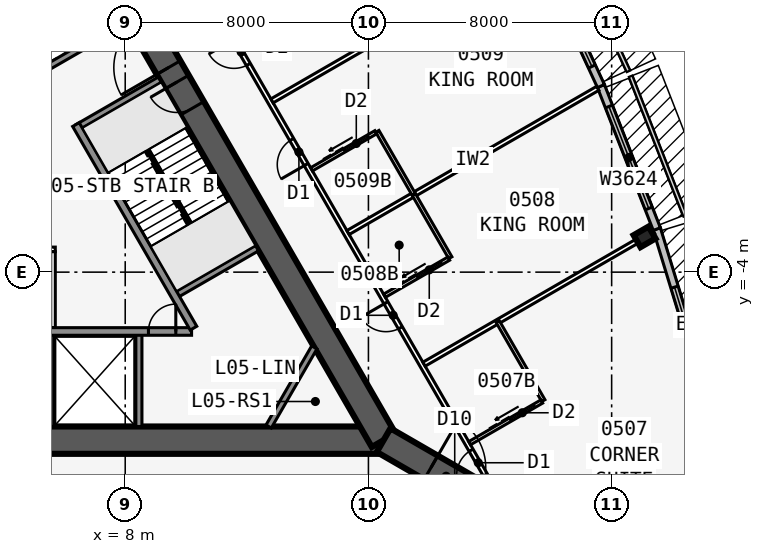
"""IFC4 building model, lengths in metres.
Left out: names, types, materials, properties, quantities, classifications, styles, units other than length and angle.
Written with IfcOpenShell. Run it as: python <this file> out.ifc"""

import sys

from ifc_helpers import new_model, si_unit, direction, frame, frame_2d, origin, origin_2d, place, context, subcontext, project, spatial, rectangle, i_section, extrude, element, fill, save


model = new_model("IFC4")
c1 = context("Model", 3, precision=1e-05, world=origin(), true_north=direction((0.0, 1.0)))
c2 = subcontext(c1, "Body", "Model", "MODEL_VIEW")
j1 = project(units=[si_unit("LENGTHUNIT", "METRE"), si_unit("PLANEANGLEUNIT", "RADIAN")], contexts=[c1])
p1 = place(None, origin())
s1 = spatial("IfcSite", under=j1, at=p1, CompositionType="ELEMENT")
p2 = place(p1, origin())
s2 = spatial("IfcBuilding", under=s1, at=p2, CompositionType="ELEMENT")
p3 = place(p2, frame((0.0, 0.0, 28.5)))
s3 = spatial("IfcBuildingStorey", under=s2, at=p3, CompositionType="ELEMENT", Elevation=28.5)
p4 = place(p3, frame((-16.5, -9.526, 0.0), z_axis=(0.0, 0.0, 1.0), x_axis=(1.0, 0.0, 0.0)))
e1 = element("IfcWall", 1, at=p4, inside=s3, PredefinedType="SHEAR", context=c2, shape_type="SweptSolid", body=[
    extrude(rectangle(XDim=33.0, YDim=0.9, at=frame_2d((16.5, 0.0))), origin(), (0.0, 0.0, 1.0), 3.4),
])
p5 = place(p4, frame((14.05, 0.0, 0.0)))
e2 = element("IfcOpeningElement", 2, at=p5, cuts=e1, PredefinedType="OPENING", context=c2, shape_type="SweptSolid", body=[
    extrude(rectangle(XDim=1.8, YDim=2.13, at=frame_2d((0.9, 1.065))), frame((0.0, 0.46, 0.0), z_axis=(0.0, -1.0, 0.0), x_axis=(1.0, 0.0, 0.0)), (0.0, 0.0, 1.0), 0.92),
])
p6 = place(p3, frame((-0.55, -5.951, 0.0), z_axis=(0.0, 0.0, 1.0), x_axis=(1.0, 0.0, 0.0)))
e3 = element("IfcWall", 3, at=p6, inside=s3, PredefinedType="SOLIDWALL", context=c2, shape_type="SweptSolid", body=[
    extrude(rectangle(XDim=10.733, YDim=0.25, at=frame_2d((5.366, 0.0))), origin(), (0.0, 0.0, 1.0), 3.235),
])
p7 = place(p6, frame((9.314, 0.0, 0.0)))
e4 = element("IfcOpeningElement", 4, at=p7, cuts=e3, PredefinedType="OPENING", context=c2, shape_type="SweptSolid", body=[
    extrude(rectangle(XDim=0.9, YDim=2.13, at=frame_2d((0.45, 1.065))), frame((0.0, 0.135, 0.0), z_axis=(0.0, -1.0, 0.0), x_axis=(1.0, 0.0, 0.0)), (0.0, 0.0, 1.0), 0.27),
])
p8 = place(p6, frame((1.05, 0.0, 0.0)))
e5 = element("IfcOpeningElement", 5, at=p8, cuts=e3, PredefinedType="OPENING", context=c2, shape_type="SweptSolid", body=[
    extrude(rectangle(XDim=1.1, YDim=2.13, at=frame_2d((0.55, 1.065))), frame((0.0, 0.135, 0.0), z_axis=(0.0, -1.0, 0.0), x_axis=(1.0, 0.0, 0.0)), (0.0, 0.0, 1.0), 0.27),
])
p9 = place(p6, frame((4.05, 0.0, 0.0)))
e6 = element("IfcOpeningElement", 6, at=p9, cuts=e3, PredefinedType="OPENING", context=c2, shape_type="SweptSolid", body=[
    extrude(rectangle(XDim=1.1, YDim=2.13, at=frame_2d((0.55, 1.065))), frame((0.0, 0.135, 0.0), z_axis=(0.0, -1.0, 0.0), x_axis=(1.0, 0.0, 0.0)), (0.0, 0.0, 1.0), 0.27),
])
for number, where, z_axis, x_axis in (
    (7, (5.55, -5.951, 0.0), (0.0, 0.0, 1.0), (0.0, -1.0, 0.0)),
    (8, (8.45, -5.951, 0.0), (0.0, 0.0, 1.0), (0.0, -1.0, 0.0)),
):
    element("IfcWall", number, at=place(p3, frame(where, z_axis=z_axis, x_axis=x_axis)), inside=s3, PredefinedType="SOLIDWALL", context=c2, shape_type="SweptSolid", body=[
        extrude(rectangle(XDim=3.125, YDim=0.2, at=frame_2d((1.562, 0.0))), origin(), (0.0, 0.0, 1.0), 3.235),
    ])
p10 = place(p3, frame((16.5, -9.526, 0.0), z_axis=(0.0, 0.0, 1.0), x_axis=(-0.499999749417, 0.866025548458, 0.0)))
e9 = element("IfcWall", 9, at=p10, inside=s3, PredefinedType="SHEAR", context=c2, shape_type="SweptSolid", body=[
    extrude(rectangle(XDim=33.0, YDim=0.9, at=frame_2d((16.5, 0.0))), origin(), (0.0, 0.0, 1.0), 3.4),
])
p11 = place(p10, frame((14.15, 0.0, 0.0)))
e10 = element("IfcOpeningElement", 10, at=p11, cuts=e9, PredefinedType="OPENING", context=c2, shape_type="SweptSolid", body=[
    extrude(rectangle(XDim=1.8, YDim=2.13, at=frame_2d((0.9, 1.065))), frame((0.0, 0.46, 0.0), z_axis=(0.0, -1.0, 0.0), x_axis=(1.0, 0.0, 0.0)), (0.0, 0.0, 1.0), 0.92),
])
p12 = place(p10, frame((12.6, 0.0, 0.0)))
e11 = element("IfcOpeningElement", 11, at=p12, cuts=e9, PredefinedType="OPENING", context=c2, shape_type="SweptSolid", body=[
    extrude(rectangle(XDim=1.0, YDim=2.13, at=frame_2d((0.5, 1.065))), frame((0.0, 0.46, 0.0), z_axis=(0.0, -1.0, 0.0), x_axis=(1.0, 0.0, 0.0)), (0.0, 0.0, 1.0), 0.92),
])
p13 = place(p3, frame((10.245, -5.843, 0.0), z_axis=(0.0, 0.0, 1.0), x_axis=(-0.499993009313, 0.866029439822, 0.0)))
e12 = element("IfcWall", 12, at=p13, inside=s3, PredefinedType="SOLIDWALL", context=c2, shape_type="SweptSolid", body=[
    extrude(rectangle(XDim=7.733, YDim=0.25, at=frame_2d((3.866, 0.0))), origin(), (0.0, 0.0, 1.0), 3.235),
])
for number, where, z_axis, x_axis in (
    (13, (9.629, -4.775, 0.0), (0.0, 0.0, 1.0), (0.866, 0.5, 0.0)),
    (14, (6.429, 0.767, 0.0), (0.0, 0.0, 1.0), (0.866, 0.5, 0.0)),
    (15, (5.329, 2.673, 0.0), (0.0, 0.0, 1.0), (0.866, 0.5, 0.0)),
):
    element("IfcWall", number, at=place(p3, frame(where, z_axis=z_axis, x_axis=x_axis)), inside=s3, PredefinedType="SOLIDWALL", context=c2, shape_type="SweptSolid", body=[
        extrude(rectangle(XDim=3.125, YDim=0.2, at=frame_2d((1.562, 0.0))), origin(), (0.0, 0.0, 1.0), 3.235),
    ])
p14 = place(p3, frame((16.5, -9.526, 0.0), z_axis=(0.0, 0.0, 1.0), x_axis=(0.866031398331, -0.499989616998, 0.0)))
e16 = element("IfcWall", 16, at=p14, inside=s3, PredefinedType="SHEAR", context=c2, shape_type="SweptSolid", body=[
    extrude(rectangle(XDim=4.746, YDim=0.9, at=frame_2d((2.373, 0.0))), origin(), (0.0, 0.0, 1.0), 3.4),
])
p15 = place(p14, frame((1.8, 0.0, 0.0)))
e17 = element("IfcOpeningElement", 17, at=p15, cuts=e16, PredefinedType="OPENING", context=c2, shape_type="SweptSolid", body=[
    extrude(rectangle(XDim=1.8, YDim=2.13, at=frame_2d((0.9, 1.065))), frame((0.0, 0.46, 0.0), z_axis=(0.0, -1.0, 0.0), x_axis=(1.0, 0.0, 0.0)), (0.0, 0.0, 1.0), 0.92),
])
p16 = place(p3, frame((25.083, -2.839, 0.0), z_axis=(0.0, 0.0, 1.0), x_axis=(-0.5, 0.866025403784, 0.0)))
e18 = element("IfcColumn", 18, at=p16, inside=s3, PredefinedType="COLUMN", context=c2, shape_type="SweptSolid", body=[
    extrude(i_section(OverallWidth=0.455, OverallDepth=0.569, WebThickness=0.078, FlangeThickness=0.125, at=origin_2d()), origin(), (0.0, 0.0, 1.0), 3.4),
])
p17 = place(p3, frame((27.88, -10.429, 0.0), z_axis=(0.0, 0.0, 1.0), x_axis=(-0.2919790669, 0.956424709265, 0.0)))
e19 = element("IfcWall", 19, at=p17, inside=s3, PredefinedType="STANDARD", context=c2, shape_type="SweptSolid", body=[
    extrude(rectangle(XDim=8.211, YDim=0.25, at=frame_2d((4.105, 0.0))), origin(), (0.0, 0.0, 1.0), 3.235),
])
p18 = place(p17, frame((2.006, 0.0, 0.45)))
e20 = element("IfcOpeningElement", 20, at=p18, cuts=e19, PredefinedType="OPENING", context=c2, shape_type="SweptSolid", body=[
    extrude(rectangle(XDim=4.2, YDim=2.4, at=frame_2d((2.1, 1.2))), frame((0.0, 0.135, 0.0), z_axis=(0.0, -1.0, 0.0), x_axis=(1.0, 0.0, 0.0)), (0.0, 0.0, 1.0), 0.27),
])
p19 = place(p3, frame((25.486, -2.584, 0.0), z_axis=(0.0, 0.0, 1.0), x_axis=(-0.364013463868, 0.931393685894, 0.0)))
e21 = element("IfcWall", 21, at=p19, inside=s3, PredefinedType="STANDARD", context=c2, shape_type="SweptSolid", body=[
    extrude(rectangle(XDim=5.058, YDim=0.25, at=frame_2d((2.529, 0.0))), origin(), (0.0, 0.0, 1.0), 3.235),
])
p20 = place(p19, frame((0.729, 0.0, 0.45)))
e22 = element("IfcOpeningElement", 22, at=p20, cuts=e21, PredefinedType="OPENING", context=c2, shape_type="SweptSolid", body=[
    extrude(rectangle(XDim=3.6, YDim=2.4, at=frame_2d((1.8, 1.2))), frame((0.0, 0.135, 0.0), z_axis=(0.0, -1.0, 0.0), x_axis=(1.0, 0.0, 0.0)), (0.0, 0.0, 1.0), 0.27),
])
p21 = place(p3, frame((23.648, 2.119, 0.0), z_axis=(0.0, 0.0, 1.0), x_axis=(-0.419203100754, 0.907892482796, 0.0)))
e23 = element("IfcWall", 23, at=p21, inside=s3, PredefinedType="STANDARD", context=c2, shape_type="SweptSolid", body=[
    extrude(rectangle(XDim=5.021, YDim=0.25, at=frame_2d((2.51, 0.0))), origin(), (0.0, 0.0, 1.0), 3.235),
])
p22 = place(p21, frame((0.71, 0.0, 0.45)))
e24 = element("IfcOpeningElement", 24, at=p22, cuts=e23, PredefinedType="OPENING", context=c2, shape_type="SweptSolid", body=[
    extrude(rectangle(XDim=3.6, YDim=2.4, at=frame_2d((1.8, 1.2))), frame((0.0, 0.135, 0.0), z_axis=(0.0, -1.0, 0.0), x_axis=(1.0, 0.0, 0.0)), (0.0, 0.0, 1.0), 0.27),
])
p23 = place(p3, frame((20.027, -10.985, 0.0), z_axis=(0.0, 0.0, 1.0), x_axis=(-0.500001677587, 0.866024435227, 0.0)))
e25 = element("IfcWall", 25, at=p23, inside=s3, PredefinedType="PARTITIONING", context=c2, shape_type="SweptSolid", body=[
    extrude(rectangle(XDim=39.054, YDim=0.15, at=frame_2d((19.527, 0.0))), origin(), (0.0, 0.0, 1.0), 3.235),
])
p24 = place(p23, frame((0.352, 0.0, 0.0)))
e26 = element("IfcOpeningElement", 26, at=p24, cuts=e25, PredefinedType="OPENING", context=c2, shape_type="SweptSolid", body=[
    extrude(rectangle(XDim=0.95, YDim=2.13, at=frame_2d((0.475, 1.065))), frame((0.0, 0.085, 0.0), z_axis=(0.0, -1.0, 0.0), x_axis=(1.0, 0.0, 0.0)), (0.0, 0.0, 1.0), 0.17),
])
p25 = place(p23, frame((5.952, 0.0, 0.0)))
e27 = element("IfcOpeningElement", 27, at=p25, cuts=e25, PredefinedType="OPENING", context=c2, shape_type="SweptSolid", body=[
    extrude(rectangle(XDim=0.95, YDim=2.13, at=frame_2d((0.475, 1.065))), frame((0.0, 0.085, 0.0), z_axis=(0.0, -1.0, 0.0), x_axis=(1.0, 0.0, 0.0)), (0.0, 0.0, 1.0), 0.17),
])
p26 = place(p23, frame((12.152, 0.0, 0.0)))
e28 = element("IfcOpeningElement", 28, at=p26, cuts=e25, PredefinedType="OPENING", context=c2, shape_type="SweptSolid", body=[
    extrude(rectangle(XDim=0.95, YDim=2.13, at=frame_2d((0.475, 1.065))), frame((0.0, 0.085, 0.0), z_axis=(0.0, -1.0, 0.0), x_axis=(1.0, 0.0, 0.0)), (0.0, 0.0, 1.0), 0.17),
])
p27 = place(p23, frame((15.952, 0.0, 0.0)))
e29 = element("IfcOpeningElement", 29, at=p27, cuts=e25, PredefinedType="OPENING", context=c2, shape_type="SweptSolid", body=[
    extrude(rectangle(XDim=0.95, YDim=2.13, at=frame_2d((0.475, 1.065))), frame((0.0, 0.085, 0.0), z_axis=(0.0, -1.0, 0.0), x_axis=(1.0, 0.0, 0.0)), (0.0, 0.0, 1.0), 0.17),
])
p28 = place(p23, frame((22.152, 0.0, 0.0)))
e30 = element("IfcOpeningElement", 30, at=p28, cuts=e25, PredefinedType="OPENING", context=c2, shape_type="SweptSolid", body=[
    extrude(rectangle(XDim=0.95, YDim=2.13, at=frame_2d((0.475, 1.065))), frame((0.0, 0.085, 0.0), z_axis=(0.0, -1.0, 0.0), x_axis=(1.0, 0.0, 0.0)), (0.0, 0.0, 1.0), 0.17),
])
p29 = place(p23, frame((25.952, 0.0, 0.0)))
e31 = element("IfcOpeningElement", 31, at=p29, cuts=e25, PredefinedType="OPENING", context=c2, shape_type="SweptSolid", body=[
    extrude(rectangle(XDim=0.95, YDim=2.13, at=frame_2d((0.475, 1.065))), frame((0.0, 0.085, 0.0), z_axis=(0.0, -1.0, 0.0), x_axis=(1.0, 0.0, 0.0)), (0.0, 0.0, 1.0), 0.17),
])
p30 = place(p23, frame((36.546, 0.0, 0.0)))
e32 = element("IfcOpeningElement", 32, at=p30, cuts=e25, PredefinedType="OPENING", context=c2, shape_type="SweptSolid", body=[
    extrude(rectangle(XDim=0.95, YDim=2.13, at=frame_2d((0.475, 1.065))), frame((0.0, 0.085, 0.0), z_axis=(0.0, -1.0, 0.0), x_axis=(1.0, 0.0, 0.0)), (0.0, 0.0, 1.0), 0.17),
])
p31 = place(p3, frame((17.829, -7.027, 0.0), z_axis=(0.0, 0.0, 1.0), x_axis=(0.866032659912, 0.499987431809, 0.0)))
e33 = element("IfcWall", 33, at=p31, inside=s3, PredefinedType="PARTITIONING", context=c2, shape_type="SweptSolid", body=[
    extrude(rectangle(XDim=8.72, YDim=0.15, at=frame_2d((4.36, 0.0))), origin(), (0.0, 0.0, 1.0), 2.389),
])
p32 = place(p3, frame((15.329, -2.697, 0.0), z_axis=(0.0, 0.0, 1.0), x_axis=(0.866018409083, 0.500012114982, 0.0)))
e34 = element("IfcWall", 34, at=p32, inside=s3, PredefinedType="PARTITIONING", context=c2, shape_type="SweptSolid", body=[
    extrude(rectangle(XDim=9.485, YDim=0.15, at=frame_2d((4.742, 0.0))), origin(), (0.0, 0.0, 1.0), 2.389),
])
p33 = place(p3, frame((12.829, 1.633, 0.0), z_axis=(0.0, 0.0, 1.0), x_axis=(0.866026934769, 0.499997348248, 0.0)))
e35 = element("IfcWall", 35, at=p33, inside=s3, PredefinedType="PARTITIONING", context=c2, shape_type="SweptSolid", body=[
    extrude(rectangle(XDim=9.943, YDim=0.15, at=frame_2d((4.971, 0.0))), origin(), (0.0, 0.0, 1.0), 2.389),
])
p34 = place(p3, frame((21.753, -8.225, 0.0), z_axis=(0.0, 0.0, 1.0), x_axis=(-0.499990139034, 0.866031096941, 0.0)))
e36 = element("IfcWall", 36, at=p34, inside=s3, PredefinedType="PLUMBINGWALL", context=c2, shape_type="SweptSolid", body=[
    extrude(rectangle(XDim=3.0, YDim=0.12, at=frame_2d((1.5, 0.0))), origin(), (0.0, 0.0, 1.0), 3.235),
])
p35 = place(p3, frame((19.329, -9.625, 0.0), z_axis=(0.0, 0.0, 1.0), x_axis=(0.866035715982, 0.499982138324, 0.0)))
e37 = element("IfcWall", 37, at=p35, inside=s3, PredefinedType="PLUMBINGWALL", context=c2, shape_type="SweptSolid", body=[
    extrude(rectangle(XDim=2.74, YDim=0.12, at=frame_2d((1.37, 0.0))), origin(), (0.0, 0.0, 1.0), 3.235),
])
p36 = place(p35, frame((1.55, 0.0, 0.0)))
e38 = element("IfcOpeningElement", 38, at=p36, cuts=e37, PredefinedType="OPENING", context=c2, shape_type="SweptSolid", body=[
    extrude(rectangle(XDim=0.9, YDim=2.13, at=frame_2d((0.45, 1.065))), frame((0.0, 0.07, 0.0), z_axis=(0.0, -1.0, 0.0), x_axis=(1.0, 0.0, 0.0)), (0.0, 0.0, 1.0), 0.14),
])
p37 = place(p3, frame((18.694, -3.526, 0.0), z_axis=(0.0, 0.0, 1.0), x_axis=(-0.500033551112, 0.866006032174, 0.0)))
e39 = element("IfcWall", 39, at=p37, inside=s3, PredefinedType="PLUMBINGWALL", context=c2, shape_type="SweptSolid", body=[
    extrude(rectangle(XDim=2.4, YDim=0.12, at=frame_2d((1.2, 0.0))), origin(), (0.0, 0.0, 1.0), 3.235),
])
p38 = place(p3, frame((16.529, -4.776, 0.0), z_axis=(0.0, 0.0, 1.0), x_axis=(0.866023955769, 0.500002508028, 0.0)))
e40 = element("IfcWall", 40, at=p38, inside=s3, PredefinedType="PLUMBINGWALL", context=c2, shape_type="SweptSolid", body=[
    extrude(rectangle(XDim=2.44, YDim=0.12, at=frame_2d((1.22, 0.0))), origin(), (0.0, 0.0, 1.0), 3.235),
])
p39 = place(p38, frame((1.25, 0.0, 0.0)))
e41 = element("IfcOpeningElement", 41, at=p39, cuts=e40, PredefinedType="OPENING", context=c2, shape_type="SweptSolid", body=[
    extrude(rectangle(XDim=0.9, YDim=2.13, at=frame_2d((0.45, 1.065))), frame((0.0, 0.07, 0.0), z_axis=(0.0, -1.0, 0.0), x_axis=(1.0, 0.0, 0.0)), (0.0, 0.0, 1.0), 0.14),
])
p40 = place(p3, frame((17.493, -1.447, 0.0), z_axis=(0.0, 0.0, 1.0), x_axis=(-0.500001309137, 0.866024647952, 0.0)))
e42 = element("IfcWall", 42, at=p40, inside=s3, PredefinedType="PLUMBINGWALL", context=c2, shape_type="SweptSolid", body=[
    extrude(rectangle(XDim=2.4, YDim=0.12, at=frame_2d((1.2, 0.0))), origin(), (0.0, 0.0, 1.0), 3.235),
])
p41 = place(p3, frame((14.128, -0.619, 0.0), z_axis=(0.0, 0.0, 1.0), x_axis=(0.866048967903, 0.499959183527, 0.0)))
e43 = element("IfcWall", 43, at=p41, inside=s3, PredefinedType="PLUMBINGWALL", context=c2, shape_type="SweptSolid", body=[
    extrude(rectangle(XDim=2.44, YDim=0.12, at=frame_2d((1.22, 0.0))), origin(), (0.0, 0.0, 1.0), 3.235),
])
p42 = place(p41, frame((1.25, 0.0, 0.0)))
e44 = element("IfcOpeningElement", 44, at=p42, cuts=e43, PredefinedType="OPENING", context=c2, shape_type="SweptSolid", body=[
    extrude(rectangle(XDim=0.9, YDim=2.13, at=frame_2d((0.45, 1.065))), frame((0.0, 0.07, 0.0), z_axis=(0.0, -1.0, 0.0), x_axis=(1.0, 0.0, 0.0)), (0.0, 0.0, 1.0), 0.14),
])
p43 = place(p3, frame((-2.65, -3.251, 0.0), z_axis=(0.0, 0.0, 1.0), x_axis=(1.0, 0.0, 0.0)))
e45 = element("IfcWall", 45, at=p43, inside=s3, PredefinedType="PARTITIONING", context=c2, shape_type="SweptSolid", body=[
    extrude(rectangle(XDim=8.35, YDim=0.15, at=frame_2d((4.175, 0.0))), origin(), (0.0, 0.0, 1.0), 3.235),
])
p44 = place(p3, frame((5.625, -5.826, 0.0), z_axis=(0.0, 0.0, 1.0), x_axis=(0.0, 1.0, 0.0)))
e46 = element("IfcWall", 46, at=p44, inside=s3, PredefinedType="PARTITIONING", context=c2, shape_type="SweptSolid", body=[
    extrude(rectangle(XDim=2.5, YDim=0.15, at=frame_2d((1.25, 0.0))), origin(), (0.0, 0.0, 1.0), 3.235),
])
p45 = place(p3, frame((14.219, -6.476, 0.0), z_axis=(0.0, 0.0, 1.0), x_axis=(-0.499952404951, -0.866052881055, 0.0)))
e47 = element("IfcWall", 47, at=p45, inside=s3, PredefinedType="SOLIDWALL", context=c2, shape_type="SweptSolid", body=[
    extrude(rectangle(XDim=3.002, YDim=0.2, at=frame_2d((1.501, 0.0))), origin(), (0.0, 0.0, 1.0), 3.235),
])
p46 = place(p3, frame((10.135, -2.401, 0.0), z_axis=(0.0, 0.0, 1.0), x_axis=(-0.499992232847, 0.866029888106, 0.0)))
e48 = element("IfcWall", 48, at=p46, inside=s3, PredefinedType="SOLIDWALL", context=c2, shape_type="SweptSolid", body=[
    extrude(rectangle(XDim=2.794, YDim=0.1, at=frame_2d((1.397, 0.0))), origin(), (0.0, 0.0, 1.0), 3.4),
])
p47 = place(p18, origin())
e49 = element("IfcWindow", 49, at=p47, inside=s3, PartitioningType="SINGLE_PANEL", PredefinedType="WINDOW", context=c2, shape_type="SweptSolid", body=[
    extrude(rectangle(XDim=4.2, YDim=2.4, at=frame_2d((2.1, 1.2))), frame((0.0, 0.03, 0.0), z_axis=(0.0, -1.0, 0.0), x_axis=(1.0, 0.0, 0.0)), (0.0, 0.0, 1.0), 0.06),
])
fill(e20, e49)
p48 = place(p20, origin())
e50 = element("IfcWindow", 50, at=p48, inside=s3, PartitioningType="SINGLE_PANEL", PredefinedType="WINDOW", context=c2, shape_type="SweptSolid", body=[
    extrude(rectangle(XDim=3.6, YDim=2.4, at=frame_2d((1.8, 1.2))), frame((0.0, 0.03, 0.0), z_axis=(0.0, -1.0, 0.0), x_axis=(1.0, 0.0, 0.0)), (0.0, 0.0, 1.0), 0.06),
])
fill(e22, e50)
p49 = place(p22, origin())
e51 = element("IfcWindow", 51, at=p49, inside=s3, PartitioningType="SINGLE_PANEL", PredefinedType="WINDOW", context=c2, shape_type="SweptSolid", body=[
    extrude(rectangle(XDim=3.6, YDim=2.4, at=frame_2d((1.8, 1.2))), frame((0.0, 0.03, 0.0), z_axis=(0.0, -1.0, 0.0), x_axis=(1.0, 0.0, 0.0)), (0.0, 0.0, 1.0), 0.06),
])
fill(e24, e51)
p50 = place(p36, origin())
e52 = element("IfcDoor", 52, at=p50, inside=s3, OperationType="SLIDING_TO_LEFT", PredefinedType="DOOR", context=c2, shape_type="SweptSolid", body=[
    extrude(rectangle(XDim=0.9, YDim=2.13, at=frame_2d((0.45, 1.065))), frame((0.0, 0.025, 0.0), z_axis=(0.0, -1.0, 0.0), x_axis=(1.0, 0.0, 0.0)), (0.0, 0.0, 1.0), 0.05),
])
fill(e38, e52)
p51 = place(p24, origin())
e53 = element("IfcDoor", 53, at=p51, inside=s3, OperationType="SINGLE_SWING_LEFT", PredefinedType="DOOR", context=c2, shape_type="SweptSolid", body=[
    extrude(rectangle(XDim=0.95, YDim=2.13, at=frame_2d((0.475, 1.065))), frame((0.0, 0.025, 0.0), z_axis=(0.0, -1.0, 0.0), x_axis=(1.0, 0.0, 0.0)), (0.0, 0.0, 1.0), 0.05),
])
fill(e26, e53)
p52 = place(p39, origin())
e54 = element("IfcDoor", 54, at=p52, inside=s3, OperationType="SLIDING_TO_LEFT", PredefinedType="DOOR", context=c2, shape_type="SweptSolid", body=[
    extrude(rectangle(XDim=0.9, YDim=2.13, at=frame_2d((0.45, 1.065))), frame((0.0, 0.025, 0.0), z_axis=(0.0, -1.0, 0.0), x_axis=(1.0, 0.0, 0.0)), (0.0, 0.0, 1.0), 0.05),
])
fill(e41, e54)
p53 = place(p25, origin())
e55 = element("IfcDoor", 55, at=p53, inside=s3, OperationType="SINGLE_SWING_RIGHT", PredefinedType="DOOR", context=c2, shape_type="SweptSolid", body=[
    extrude(rectangle(XDim=0.95, YDim=2.13, at=frame_2d((0.475, 1.065))), frame((0.0, 0.025, 0.0), z_axis=(0.0, -1.0, 0.0), x_axis=(1.0, 0.0, 0.0)), (0.0, 0.0, 1.0), 0.05),
])
fill(e27, e55)
p54 = place(p42, origin())
e56 = element("IfcDoor", 56, at=p54, inside=s3, OperationType="SLIDING_TO_LEFT", PredefinedType="DOOR", context=c2, shape_type="SweptSolid", body=[
    extrude(rectangle(XDim=0.9, YDim=2.13, at=frame_2d((0.45, 1.065))), frame((0.0, 0.025, 0.0), z_axis=(0.0, -1.0, 0.0), x_axis=(1.0, 0.0, 0.0)), (0.0, 0.0, 1.0), 0.05),
])
fill(e44, e56)
p55 = place(p26, origin())
e57 = element("IfcDoor", 57, at=p55, inside=s3, OperationType="SINGLE_SWING_LEFT", PredefinedType="DOOR", context=c2, shape_type="SweptSolid", body=[
    extrude(rectangle(XDim=0.95, YDim=2.13, at=frame_2d((0.475, 1.065))), frame((0.0, 0.025, 0.0), z_axis=(0.0, -1.0, 0.0), x_axis=(1.0, 0.0, 0.0)), (0.0, 0.0, 1.0), 0.05),
])
fill(e28, e57)
p56 = place(p27, origin())
e58 = element("IfcDoor", 58, at=p56, inside=s3, OperationType="SINGLE_SWING_RIGHT", PredefinedType="DOOR", context=c2, shape_type="SweptSolid", body=[
    extrude(rectangle(XDim=0.95, YDim=2.13, at=frame_2d((0.475, 1.065))), frame((0.0, 0.025, 0.0), z_axis=(0.0, -1.0, 0.0), x_axis=(1.0, 0.0, 0.0)), (0.0, 0.0, 1.0), 0.05),
])
fill(e29, e58)
p57 = place(p11, origin())
e59 = element("IfcDoor", 59, at=p57, inside=s3, OperationType="DOUBLE_DOOR_SINGLE_SWING", PredefinedType="DOOR", context=c2, shape_type="SweptSolid", body=[
    extrude(rectangle(XDim=1.8, YDim=2.13, at=frame_2d((0.9, 1.065))), frame((0.0, 0.025, 0.0), z_axis=(0.0, -1.0, 0.0), x_axis=(1.0, 0.0, 0.0)), (0.0, 0.0, 1.0), 0.05),
])
fill(e10, e59)
p58 = place(p12, origin())
e60 = element("IfcDoor", 60, at=p58, inside=s3, OperationType="SINGLE_SWING_RIGHT", PredefinedType="DOOR", context=c2, shape_type="SweptSolid", body=[
    extrude(rectangle(XDim=1.0, YDim=2.13, at=frame_2d((0.5, 1.065))), frame((0.0, 0.025, 0.0), z_axis=(0.0, -1.0, 0.0), x_axis=(1.0, 0.0, 0.0)), (0.0, 0.0, 1.0), 0.05),
])
fill(e11, e60)
p59 = place(p15, origin())
e61 = element("IfcDoor", 61, at=p59, inside=s3, OperationType="DOUBLE_DOOR_DOUBLE_SWING", PredefinedType="DOOR", context=c2, shape_type="SweptSolid", body=[
    extrude(rectangle(XDim=1.8, YDim=2.13, at=frame_2d((0.9, 1.065))), frame((0.0, 0.025, 0.0), z_axis=(0.0, -1.0, 0.0), x_axis=(1.0, 0.0, 0.0)), (0.0, 0.0, 1.0), 0.05),
])
fill(e17, e61)
p60 = place(p7, origin())
e62 = element("IfcDoor", 62, at=p60, inside=s3, OperationType="SINGLE_SWING_RIGHT", PredefinedType="DOOR", context=c2, shape_type="SweptSolid", body=[
    extrude(rectangle(XDim=0.9, YDim=2.13, at=frame_2d((0.45, 1.065))), frame((0.0, 0.025, 0.0), z_axis=(0.0, -1.0, 0.0), x_axis=(1.0, 0.0, 0.0)), (0.0, 0.0, 1.0), 0.05),
])
fill(e4, e62)
save(model, sys.argv[1])
